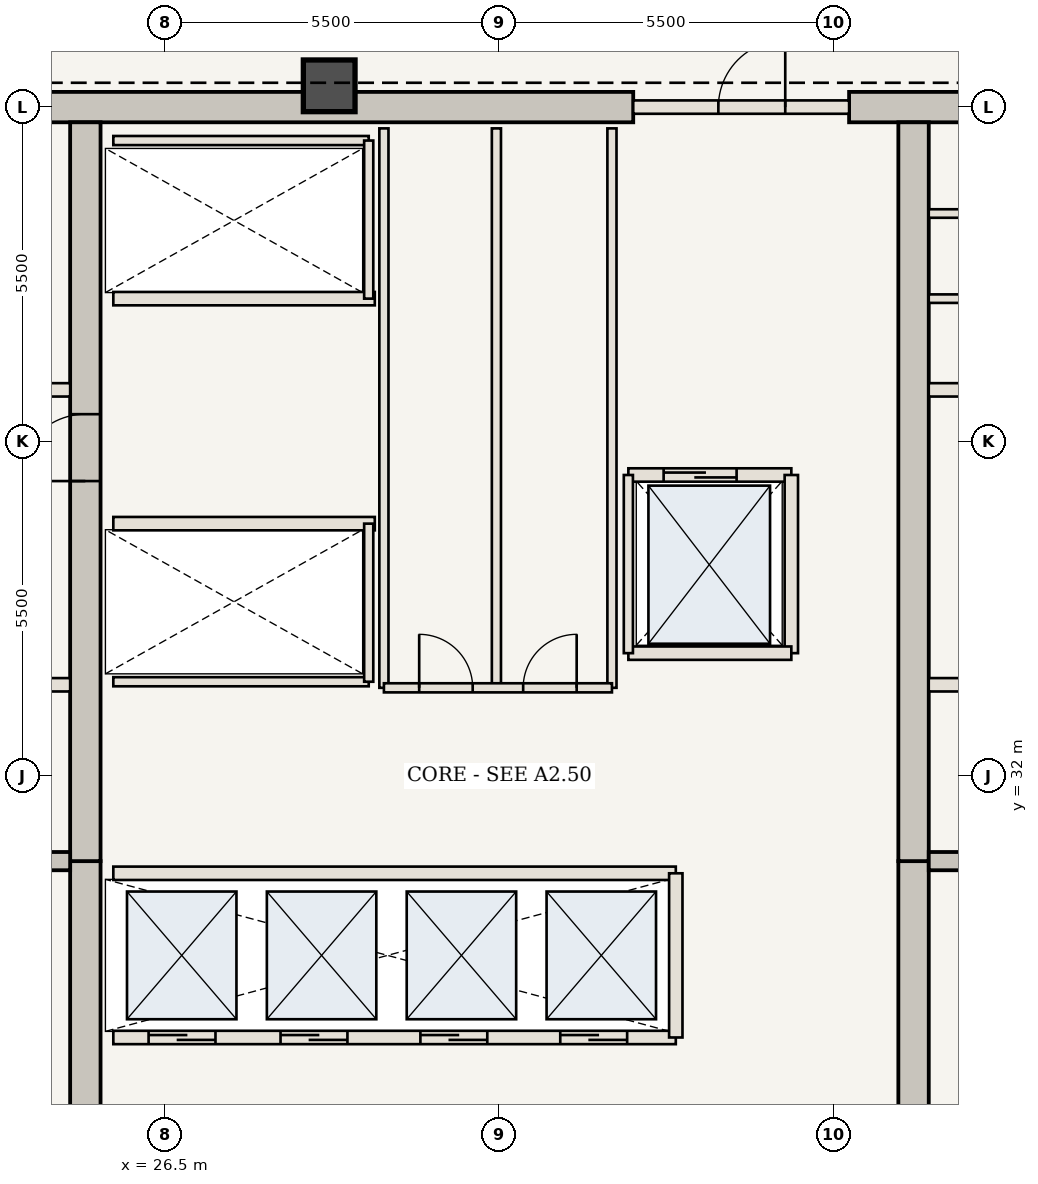
"""IFC4 building model, lengths in metres.
Left out: names, types, materials, properties, quantities, classifications, styles, units other than length and angle.
Written with IfcOpenShell. Run it as: python <this file> out.ifc"""

import sys

from ifc_helpers import new_model, si_unit, direction, frame, frame_2d, origin, origin_2d, place, context, subcontext, project, spatial, rectangle, extrude, element, fill, save


model = new_model("IFC4")
c1 = context("Model", 3, precision=1e-05, world=origin(), true_north=direction((0.0, 1.0)))
c2 = subcontext(c1, "Body", "Model", "MODEL_VIEW")
j1 = project(units=[si_unit("LENGTHUNIT", "METRE"), si_unit("PLANEANGLEUNIT", "RADIAN")], contexts=[c1])
p1 = place(None, origin())
s1 = spatial("IfcSite", under=j1, at=p1, CompositionType="ELEMENT")
p2 = place(p1, origin())
s2 = spatial("IfcBuilding", under=s1, at=p2, CompositionType="ELEMENT")
p3 = place(p2, frame((0.0, 0.0, 225.4)))
s3 = spatial("IfcBuildingStorey", under=s2, at=p3, CompositionType="ELEMENT", Elevation=225.4)
p4 = place(p3, frame((21.41, 43.0, 0.0), z_axis=(0.0, 0.0, 1.0), x_axis=(1.0, 0.0, 0.0)))
e1 = element("IfcWall", 1, at=p4, inside=s3, PredefinedType="SHEAR", context=c2, shape_type="SweptSolid", body=[
    extrude(rectangle(XDim=12.79, YDim=0.5, at=frame_2d((6.395, 0.0))), origin(), (0.0, 0.0, 1.0), 3.85),
])
p5 = place(p3, frame((37.75, 43.0, 0.0), z_axis=(0.0, 0.0, 1.0), x_axis=(1.0, 0.0, 0.0)))
e2 = element("IfcWall", 2, at=p5, inside=s3, PredefinedType="SHEAR", context=c2, shape_type="SweptSolid", body=[
    extrude(rectangle(XDim=4.84, YDim=0.5, at=frame_2d((2.42, 0.0))), origin(), (0.0, 0.0, 1.0), 3.85),
])
p6 = place(p3, frame((25.19, 21.2, 0.0), z_axis=(0.0, 0.0, 1.0), x_axis=(0.0, 1.0, 0.0)))
e3 = element("IfcWall", 3, at=p6, inside=s3, PredefinedType="SHEAR", context=c2, shape_type="SweptSolid", body=[
    extrude(rectangle(XDim=9.4, YDim=0.5, at=frame_2d((4.7, 0.0))), origin(), (0.0, 0.0, 1.0), 3.85),
])
p7 = place(p3, frame((25.19, 30.6, 0.0), z_axis=(0.0, 0.0, 1.0), x_axis=(0.0, 1.0, 0.0)))
e4 = element("IfcWall", 4, at=p7, inside=s3, PredefinedType="SHEAR", context=c2, shape_type="SweptSolid", body=[
    extrude(rectangle(XDim=12.15, YDim=0.5, at=frame_2d((6.075, 0.0))), origin(), (0.0, 0.0, 1.0), 3.85),
])
p8 = place(p7, frame((6.25, 0.0, 0.0)))
e5 = element("IfcOpeningElement", 5, at=p8, cuts=e4, PredefinedType="OPENING", context=c2, shape_type="SweptSolid", body=[
    extrude(rectangle(XDim=1.1, YDim=2.15, at=frame_2d((0.55, 1.075))), frame((0.0, 0.26, 0.0), z_axis=(0.0, -1.0, 0.0), x_axis=(1.0, 0.0, 0.0)), (0.0, 0.0, 1.0), 0.52),
])
p9 = place(p3, frame((38.81, 21.2, 0.0), z_axis=(0.0, 0.0, 1.0), x_axis=(0.0, 1.0, 0.0)))
e6 = element("IfcWall", 6, at=p9, inside=s3, PredefinedType="SHEAR", context=c2, shape_type="SweptSolid", body=[
    extrude(rectangle(XDim=9.4, YDim=0.5, at=frame_2d((4.7, 0.0))), origin(), (0.0, 0.0, 1.0), 3.85),
])
p10 = place(p3, frame((38.81, 30.6, 0.0), z_axis=(0.0, 0.0, 1.0), x_axis=(0.0, 1.0, 0.0)))
e7 = element("IfcWall", 7, at=p10, inside=s3, PredefinedType="SHEAR", context=c2, shape_type="SweptSolid", body=[
    extrude(rectangle(XDim=12.15, YDim=0.5, at=frame_2d((6.075, 0.0))), origin(), (0.0, 0.0, 1.0), 3.85),
])
p11 = place(p3, frame((29.2, 43.35, 0.0), z_axis=(0.0, 0.0, 1.0), x_axis=(1.0, 0.0, 0.0)))
e8 = element("IfcColumn", 8, at=p11, inside=s3, PredefinedType="COLUMN", context=c2, shape_type="SweptSolid", body=[
    extrude(rectangle(XDim=0.85, YDim=0.85, at=origin_2d()), origin(), (0.0, 0.0, 1.0), 3.85),
])
for number, where, z_axis, x_axis in (
    (9, (21.41, 30.6, 0.0), (0.0, 0.0, 1.0), (1.0, 0.0, 0.0)),
    (10, (39.06, 30.6, 0.0), (0.0, 0.0, 1.0), (1.0, 0.0, 0.0)),
):
    element("IfcWall", number, at=place(p3, frame(where, z_axis=z_axis, x_axis=x_axis)), inside=s3, PredefinedType="SHEAR", context=c2, shape_type="SweptSolid", body=[
        extrude(rectangle(XDim=3.53, YDim=0.3, at=frame_2d((1.765, 0.0))), origin(), (0.0, 0.0, 1.0), 3.685),
    ])
p12 = place(p3, frame((21.41, 33.5, 0.0), z_axis=(0.0, 0.0, 1.0), x_axis=(1.0, 0.0, 0.0)))
e11 = element("IfcWall", 11, at=p12, inside=s3, PredefinedType="STANDARD", context=c2, shape_type="SweptSolid", body=[
    extrude(rectangle(XDim=3.53, YDim=0.22, at=frame_2d((1.765, 0.0))), origin(), (0.0, 0.0, 1.0), 3.685),
])
p13 = place(p12, frame((0.75, 0.0, 0.0)))
e12 = element("IfcOpeningElement", 12, at=p13, cuts=e11, PredefinedType="OPENING", context=c2, shape_type="SweptSolid", body=[
    extrude(rectangle(XDim=1.2, YDim=2.2, at=frame_2d((0.6, 1.1))), frame((0.0, 0.12, 0.0), z_axis=(0.0, -1.0, 0.0), x_axis=(1.0, 0.0, 0.0)), (0.0, 0.0, 1.0), 0.24),
])
p14 = place(p3, frame((39.06, 33.5, 0.0), z_axis=(0.0, 0.0, 1.0), x_axis=(1.0, 0.0, 0.0)))
e13 = element("IfcWall", 13, at=p14, inside=s3, PredefinedType="STANDARD", context=c2, shape_type="SweptSolid", body=[
    extrude(rectangle(XDim=3.53, YDim=0.22, at=frame_2d((1.765, 0.0))), origin(), (0.0, 0.0, 1.0), 3.685),
])
p15 = place(p14, frame((1.55, 0.0, 0.0)))
e14 = element("IfcOpeningElement", 14, at=p15, cuts=e13, PredefinedType="OPENING", context=c2, shape_type="SweptSolid", body=[
    extrude(rectangle(XDim=1.2, YDim=2.2, at=frame_2d((0.6, 1.1))), frame((0.0, 0.12, 0.0), z_axis=(0.0, -1.0, 0.0), x_axis=(1.0, 0.0, 0.0)), (0.0, 0.0, 1.0), 0.24),
])
for number, where, z_axis, x_axis in (
    (15, (21.41, 38.35, 0.0), (0.0, 0.0, 1.0), (1.0, 0.0, 0.0)),
    (16, (39.06, 38.35, 0.0), (0.0, 0.0, 1.0), (1.0, 0.0, 0.0)),
):
    element("IfcWall", number, at=place(p3, frame(where, z_axis=z_axis, x_axis=x_axis)), inside=s3, PredefinedType="STANDARD", context=c2, shape_type="SweptSolid", body=[
        extrude(rectangle(XDim=3.53, YDim=0.22, at=frame_2d((1.765, 0.0))), origin(), (0.0, 0.0, 1.0), 3.685),
    ])
for number, where, z_axis, x_axis in (
    (17, (39.06, 39.85, 0.0), (0.0, 0.0, 1.0), (1.0, 0.0, 0.0)),
    (18, (39.06, 41.25, 0.0), (0.0, 0.0, 1.0), (1.0, 0.0, 0.0)),
):
    element("IfcWall", number, at=place(p3, frame(where, z_axis=z_axis, x_axis=x_axis)), inside=s3, PredefinedType="STANDARD", context=c2, shape_type="SweptSolid", body=[
        extrude(rectangle(XDim=3.53, YDim=0.14, at=frame_2d((1.765, 0.0))), origin(), (0.0, 0.0, 1.0), 3.685),
    ])
p16 = place(p3, frame((25.65, 27.7, 0.0), z_axis=(0.0, 0.0, 1.0), x_axis=(1.0, 0.0, 0.0)))
e19 = element("IfcWall", 19, at=p16, inside=s3, PredefinedType="STANDARD", context=c2, shape_type="SweptSolid", body=[
    extrude(rectangle(XDim=9.25, YDim=0.22, at=frame_2d((4.625, 0.0))), origin(), (0.0, 0.0, 1.0), 3.685),
])
p17 = place(p16, frame((0.58, 0.0, 0.0)))
e20 = element("IfcOpeningElement", 20, at=p17, cuts=e19, PredefinedType="OPENING", context=c2, shape_type="SweptSolid", body=[
    extrude(rectangle(XDim=1.1, YDim=2.15, at=frame_2d((0.55, 1.075))), frame((0.0, 0.12, 0.0), z_axis=(0.0, -1.0, 0.0), x_axis=(1.0, 0.0, 0.0)), (0.0, 0.0, 1.0), 0.24),
])
p18 = place(p16, frame((2.75, 0.0, 0.0)))
e21 = element("IfcOpeningElement", 21, at=p18, cuts=e19, PredefinedType="OPENING", context=c2, shape_type="SweptSolid", body=[
    extrude(rectangle(XDim=1.1, YDim=2.15, at=frame_2d((0.55, 1.075))), frame((0.0, 0.12, 0.0), z_axis=(0.0, -1.0, 0.0), x_axis=(1.0, 0.0, 0.0)), (0.0, 0.0, 1.0), 0.24),
])
p19 = place(p16, frame((5.05, 0.0, 0.0)))
e22 = element("IfcOpeningElement", 22, at=p19, cuts=e19, PredefinedType="OPENING", context=c2, shape_type="SweptSolid", body=[
    extrude(rectangle(XDim=1.1, YDim=2.15, at=frame_2d((0.55, 1.075))), frame((0.0, 0.12, 0.0), z_axis=(0.0, -1.0, 0.0), x_axis=(1.0, 0.0, 0.0)), (0.0, 0.0, 1.0), 0.24),
])
p20 = place(p16, frame((7.35, 0.0, 0.0)))
e23 = element("IfcOpeningElement", 23, at=p20, cuts=e19, PredefinedType="OPENING", context=c2, shape_type="SweptSolid", body=[
    extrude(rectangle(XDim=1.1, YDim=2.15, at=frame_2d((0.55, 1.075))), frame((0.0, 0.12, 0.0), z_axis=(0.0, -1.0, 0.0), x_axis=(1.0, 0.0, 0.0)), (0.0, 0.0, 1.0), 0.24),
])
p21 = place(p3, frame((25.65, 30.4, 0.0), z_axis=(0.0, 0.0, 1.0), x_axis=(1.0, 0.0, 0.0)))
e24 = element("IfcWall", 24, at=p21, inside=s3, PredefinedType="STANDARD", context=c2, shape_type="SweptSolid", body=[
    extrude(rectangle(XDim=9.25, YDim=0.22, at=frame_2d((4.625, 0.0))), origin(), (0.0, 0.0, 1.0), 3.685),
])
p22 = place(p3, frame((34.9, 27.7, 0.0), z_axis=(0.0, 0.0, 1.0), x_axis=(0.0, 1.0, 0.0)))
e25 = element("IfcWall", 25, at=p22, inside=s3, PredefinedType="STANDARD", context=c2, shape_type="SweptSolid", body=[
    extrude(rectangle(XDim=2.7, YDim=0.22, at=frame_2d((1.35, 0.0))), origin(), (0.0, 0.0, 1.0), 3.685),
])
p23 = place(p3, frame((25.65, 36.15, 0.0), z_axis=(0.0, 0.0, 1.0), x_axis=(1.0, 0.0, 0.0)))
e26 = element("IfcWall", 26, at=p23, inside=s3, PredefinedType="STANDARD", context=c2, shape_type="SweptSolid", body=[
    extrude(rectangle(XDim=4.3, YDim=0.22, at=frame_2d((2.15, 0.0))), origin(), (0.0, 0.0, 1.0), 3.685),
])
p24 = place(p3, frame((25.65, 33.55, 0.0), z_axis=(0.0, 0.0, 1.0), x_axis=(1.0, 0.0, 0.0)))
e27 = element("IfcWall", 27, at=p24, inside=s3, PredefinedType="STANDARD", context=c2, shape_type="SweptSolid", body=[
    extrude(rectangle(XDim=4.2, YDim=0.15, at=frame_2d((2.1, 0.0))), origin(), (0.0, 0.0, 1.0), 3.685),
])
p25 = place(p3, frame((29.85, 33.55, 0.0), z_axis=(0.0, 0.0, 1.0), x_axis=(0.0, 1.0, 0.0)))
e28 = element("IfcWall", 28, at=p25, inside=s3, PredefinedType="STANDARD", context=c2, shape_type="SweptSolid", body=[
    extrude(rectangle(XDim=2.6, YDim=0.15, at=frame_2d((1.3, 0.0))), origin(), (0.0, 0.0, 1.0), 3.685),
])
p26 = place(p3, frame((25.65, 39.85, 0.0), z_axis=(0.0, 0.0, 1.0), x_axis=(1.0, 0.0, 0.0)))
e29 = element("IfcWall", 29, at=p26, inside=s3, PredefinedType="STANDARD", context=c2, shape_type="SweptSolid", body=[
    extrude(rectangle(XDim=4.3, YDim=0.22, at=frame_2d((2.15, 0.0))), origin(), (0.0, 0.0, 1.0), 3.685),
])
p27 = place(p3, frame((25.65, 42.45, 0.0), z_axis=(0.0, 0.0, 1.0), x_axis=(1.0, 0.0, 0.0)))
e30 = element("IfcWall", 30, at=p27, inside=s3, PredefinedType="STANDARD", context=c2, shape_type="SweptSolid", body=[
    extrude(rectangle(XDim=4.2, YDim=0.15, at=frame_2d((2.1, 0.0))), origin(), (0.0, 0.0, 1.0), 3.685),
])
p28 = place(p3, frame((29.85, 39.85, 0.0), z_axis=(0.0, 0.0, 1.0), x_axis=(0.0, 1.0, 0.0)))
e31 = element("IfcWall", 31, at=p28, inside=s3, PredefinedType="STANDARD", context=c2, shape_type="SweptSolid", body=[
    extrude(rectangle(XDim=2.6, YDim=0.15, at=frame_2d((1.3, 0.0))), origin(), (0.0, 0.0, 1.0), 3.685),
])
for number, where, z_axis, x_axis in (
    (32, (30.1, 33.45, 0.0), (0.0, 0.0, 1.0), (0.0, 1.0, 0.0)),
    (33, (31.95, 33.45, 0.0), (0.0, 0.0, 1.0), (0.0, 1.0, 0.0)),
    (34, (33.85, 33.45, 0.0), (0.0, 0.0, 1.0), (0.0, 1.0, 0.0)),
):
    element("IfcWall", number, at=place(p3, frame(where, z_axis=z_axis, x_axis=x_axis)), inside=s3, PredefinedType="STANDARD", context=c2, shape_type="SweptSolid", body=[
        extrude(rectangle(XDim=9.2, YDim=0.15, at=frame_2d((4.6, 0.0))), origin(), (0.0, 0.0, 1.0), 3.685),
    ])
p29 = place(p3, frame((30.1, 33.45, 0.0), z_axis=(0.0, 0.0, 1.0), x_axis=(1.0, 0.0, 0.0)))
e35 = element("IfcWall", 35, at=p29, inside=s3, PredefinedType="STANDARD", context=c2, shape_type="SweptSolid", body=[
    extrude(rectangle(XDim=3.75, YDim=0.15, at=frame_2d((1.875, 0.0))), origin(), (0.0, 0.0, 1.0), 3.685),
])
p30 = place(p29, frame((0.58, 0.0, 0.0)))
e36 = element("IfcOpeningElement", 36, at=p30, cuts=e35, PredefinedType="OPENING", context=c2, shape_type="SweptSolid", body=[
    extrude(rectangle(XDim=0.88, YDim=2.1, at=frame_2d((0.44, 1.05))), frame((0.0, 0.085, 0.0), z_axis=(0.0, -1.0, 0.0), x_axis=(1.0, 0.0, 0.0)), (0.0, 0.0, 1.0), 0.17),
])
p31 = place(p29, frame((2.29, 0.0, 0.0)))
e37 = element("IfcOpeningElement", 37, at=p31, cuts=e35, PredefinedType="OPENING", context=c2, shape_type="SweptSolid", body=[
    extrude(rectangle(XDim=0.88, YDim=2.1, at=frame_2d((0.44, 1.05))), frame((0.0, 0.085, 0.0), z_axis=(0.0, -1.0, 0.0), x_axis=(1.0, 0.0, 0.0)), (0.0, 0.0, 1.0), 0.17),
])
p32 = place(p3, frame((34.2, 43.0, 0.0), z_axis=(0.0, 0.0, 1.0), x_axis=(1.0, 0.0, 0.0)))
e38 = element("IfcWall", 38, at=p32, inside=s3, PredefinedType="STANDARD", context=c2, shape_type="SweptSolid", body=[
    extrude(rectangle(XDim=3.55, YDim=0.22, at=frame_2d((1.775, 0.0))), origin(), (0.0, 0.0, 1.0), 3.685),
])
p33 = place(p32, frame((1.4, 0.0, 0.0)))
e39 = element("IfcOpeningElement", 39, at=p33, cuts=e38, PredefinedType="OPENING", context=c2, shape_type="SweptSolid", body=[
    extrude(rectangle(XDim=1.1, YDim=2.15, at=frame_2d((0.55, 1.075))), frame((0.0, 0.12, 0.0), z_axis=(0.0, -1.0, 0.0), x_axis=(1.0, 0.0, 0.0)), (0.0, 0.0, 1.0), 0.24),
])
p34 = place(p3, frame((34.12, 36.95, 0.0), z_axis=(0.0, 0.0, 1.0), x_axis=(1.0, 0.0, 0.0)))
e40 = element("IfcWall", 40, at=p34, inside=s3, PredefinedType="STANDARD", context=c2, shape_type="SweptSolid", body=[
    extrude(rectangle(XDim=2.68, YDim=0.22, at=frame_2d((1.34, 0.0))), origin(), (0.0, 0.0, 1.0), 3.685),
])
p35 = place(p34, frame((0.58, 0.0, 0.0)))
e41 = element("IfcOpeningElement", 41, at=p35, cuts=e40, PredefinedType="OPENING", context=c2, shape_type="SweptSolid", body=[
    extrude(rectangle(XDim=1.2, YDim=2.2, at=frame_2d((0.6, 1.1))), frame((0.0, 0.12, 0.0), z_axis=(0.0, -1.0, 0.0), x_axis=(1.0, 0.0, 0.0)), (0.0, 0.0, 1.0), 0.24),
])
p36 = place(p3, frame((36.8, 34.02, 0.0), z_axis=(0.0, 0.0, 1.0), x_axis=(0.0, 1.0, 0.0)))
e42 = element("IfcWall", 42, at=p36, inside=s3, PredefinedType="STANDARD", context=c2, shape_type="SweptSolid", body=[
    extrude(rectangle(XDim=2.93, YDim=0.22, at=frame_2d((1.465, 0.0))), origin(), (0.0, 0.0, 1.0), 3.685),
])
p37 = place(p3, frame((34.12, 34.02, 0.0), z_axis=(0.0, 0.0, 1.0), x_axis=(1.0, 0.0, 0.0)))
e43 = element("IfcWall", 43, at=p37, inside=s3, PredefinedType="STANDARD", context=c2, shape_type="SweptSolid", body=[
    extrude(rectangle(XDim=2.68, YDim=0.22, at=frame_2d((1.34, 0.0))), origin(), (0.0, 0.0, 1.0), 3.685),
])
p38 = place(p3, frame((34.12, 34.02, 0.0), z_axis=(0.0, 0.0, 1.0), x_axis=(0.0, 1.0, 0.0)))
e44 = element("IfcWall", 44, at=p38, inside=s3, PredefinedType="STANDARD", context=c2, shape_type="SweptSolid", body=[
    extrude(rectangle(XDim=2.93, YDim=0.15, at=frame_2d((1.465, 0.0))), origin(), (0.0, 0.0, 1.0), 3.685),
])
p39 = place(p8, origin())
e45 = element("IfcDoor", 45, at=p39, inside=s3, OperationType="SINGLE_SWING_LEFT", PredefinedType="DOOR", context=c2, shape_type="SweptSolid", body=[
    extrude(rectangle(XDim=1.1, YDim=2.15, at=frame_2d((0.55, 1.075))), frame((0.0, 0.025, 0.0), z_axis=(0.0, -1.0, 0.0), x_axis=(1.0, 0.0, 0.0)), (0.0, 0.0, 1.0), 0.05),
])
fill(e5, e45)
p40 = place(p17, origin())
e46 = element("IfcDoor", 46, at=p40, inside=s3, OperationType="DOUBLE_DOOR_SLIDING", PredefinedType="DOOR", context=c2, shape_type="SweptSolid", body=[
    extrude(rectangle(XDim=1.1, YDim=2.15, at=frame_2d((0.55, 1.075))), frame((0.0, 0.025, 0.0), z_axis=(0.0, -1.0, 0.0), x_axis=(1.0, 0.0, 0.0)), (0.0, 0.0, 1.0), 0.05),
])
fill(e20, e46)
p41 = place(p18, origin())
e47 = element("IfcDoor", 47, at=p41, inside=s3, OperationType="DOUBLE_DOOR_SLIDING", PredefinedType="DOOR", context=c2, shape_type="SweptSolid", body=[
    extrude(rectangle(XDim=1.1, YDim=2.15, at=frame_2d((0.55, 1.075))), frame((0.0, 0.025, 0.0), z_axis=(0.0, -1.0, 0.0), x_axis=(1.0, 0.0, 0.0)), (0.0, 0.0, 1.0), 0.05),
])
fill(e21, e47)
p42 = place(p19, origin())
e48 = element("IfcDoor", 48, at=p42, inside=s3, OperationType="DOUBLE_DOOR_SLIDING", PredefinedType="DOOR", context=c2, shape_type="SweptSolid", body=[
    extrude(rectangle(XDim=1.1, YDim=2.15, at=frame_2d((0.55, 1.075))), frame((0.0, 0.025, 0.0), z_axis=(0.0, -1.0, 0.0), x_axis=(1.0, 0.0, 0.0)), (0.0, 0.0, 1.0), 0.05),
])
fill(e22, e48)
p43 = place(p20, origin())
e49 = element("IfcDoor", 49, at=p43, inside=s3, OperationType="DOUBLE_DOOR_SLIDING", PredefinedType="DOOR", context=c2, shape_type="SweptSolid", body=[
    extrude(rectangle(XDim=1.1, YDim=2.15, at=frame_2d((0.55, 1.075))), frame((0.0, 0.025, 0.0), z_axis=(0.0, -1.0, 0.0), x_axis=(1.0, 0.0, 0.0)), (0.0, 0.0, 1.0), 0.05),
])
fill(e23, e49)
p44 = place(p30, origin())
e50 = element("IfcDoor", 50, at=p44, inside=s3, OperationType="SINGLE_SWING_LEFT", PredefinedType="DOOR", context=c2, shape_type="SweptSolid", body=[
    extrude(rectangle(XDim=0.88, YDim=2.1, at=frame_2d((0.44, 1.05))), frame((0.0, 0.025, 0.0), z_axis=(0.0, -1.0, 0.0), x_axis=(1.0, 0.0, 0.0)), (0.0, 0.0, 1.0), 0.05),
])
fill(e36, e50)
p45 = place(p31, origin())
e51 = element("IfcDoor", 51, at=p45, inside=s3, OperationType="SINGLE_SWING_RIGHT", PredefinedType="DOOR", context=c2, shape_type="SweptSolid", body=[
    extrude(rectangle(XDim=0.88, YDim=2.1, at=frame_2d((0.44, 1.05))), frame((0.0, 0.025, 0.0), z_axis=(0.0, -1.0, 0.0), x_axis=(1.0, 0.0, 0.0)), (0.0, 0.0, 1.0), 0.05),
])
fill(e37, e51)
p46 = place(p33, origin())
e52 = element("IfcDoor", 52, at=p46, inside=s3, OperationType="SINGLE_SWING_RIGHT", PredefinedType="DOOR", context=c2, shape_type="SweptSolid", body=[
    extrude(rectangle(XDim=1.1, YDim=2.15, at=frame_2d((0.55, 1.075))), frame((0.0, 0.025, 0.0), z_axis=(0.0, -1.0, 0.0), x_axis=(1.0, 0.0, 0.0)), (0.0, 0.0, 1.0), 0.05),
])
fill(e39, e52)
p47 = place(p35, origin())
e53 = element("IfcDoor", 53, at=p47, inside=s3, OperationType="DOUBLE_DOOR_SLIDING", PredefinedType="DOOR", context=c2, shape_type="SweptSolid", body=[
    extrude(rectangle(XDim=1.2, YDim=2.2, at=frame_2d((0.6, 1.1))), frame((0.0, 0.025, 0.0), z_axis=(0.0, -1.0, 0.0), x_axis=(1.0, 0.0, 0.0)), (0.0, 0.0, 1.0), 0.05),
])
fill(e41, e53)
save(model, sys.argv[1])
